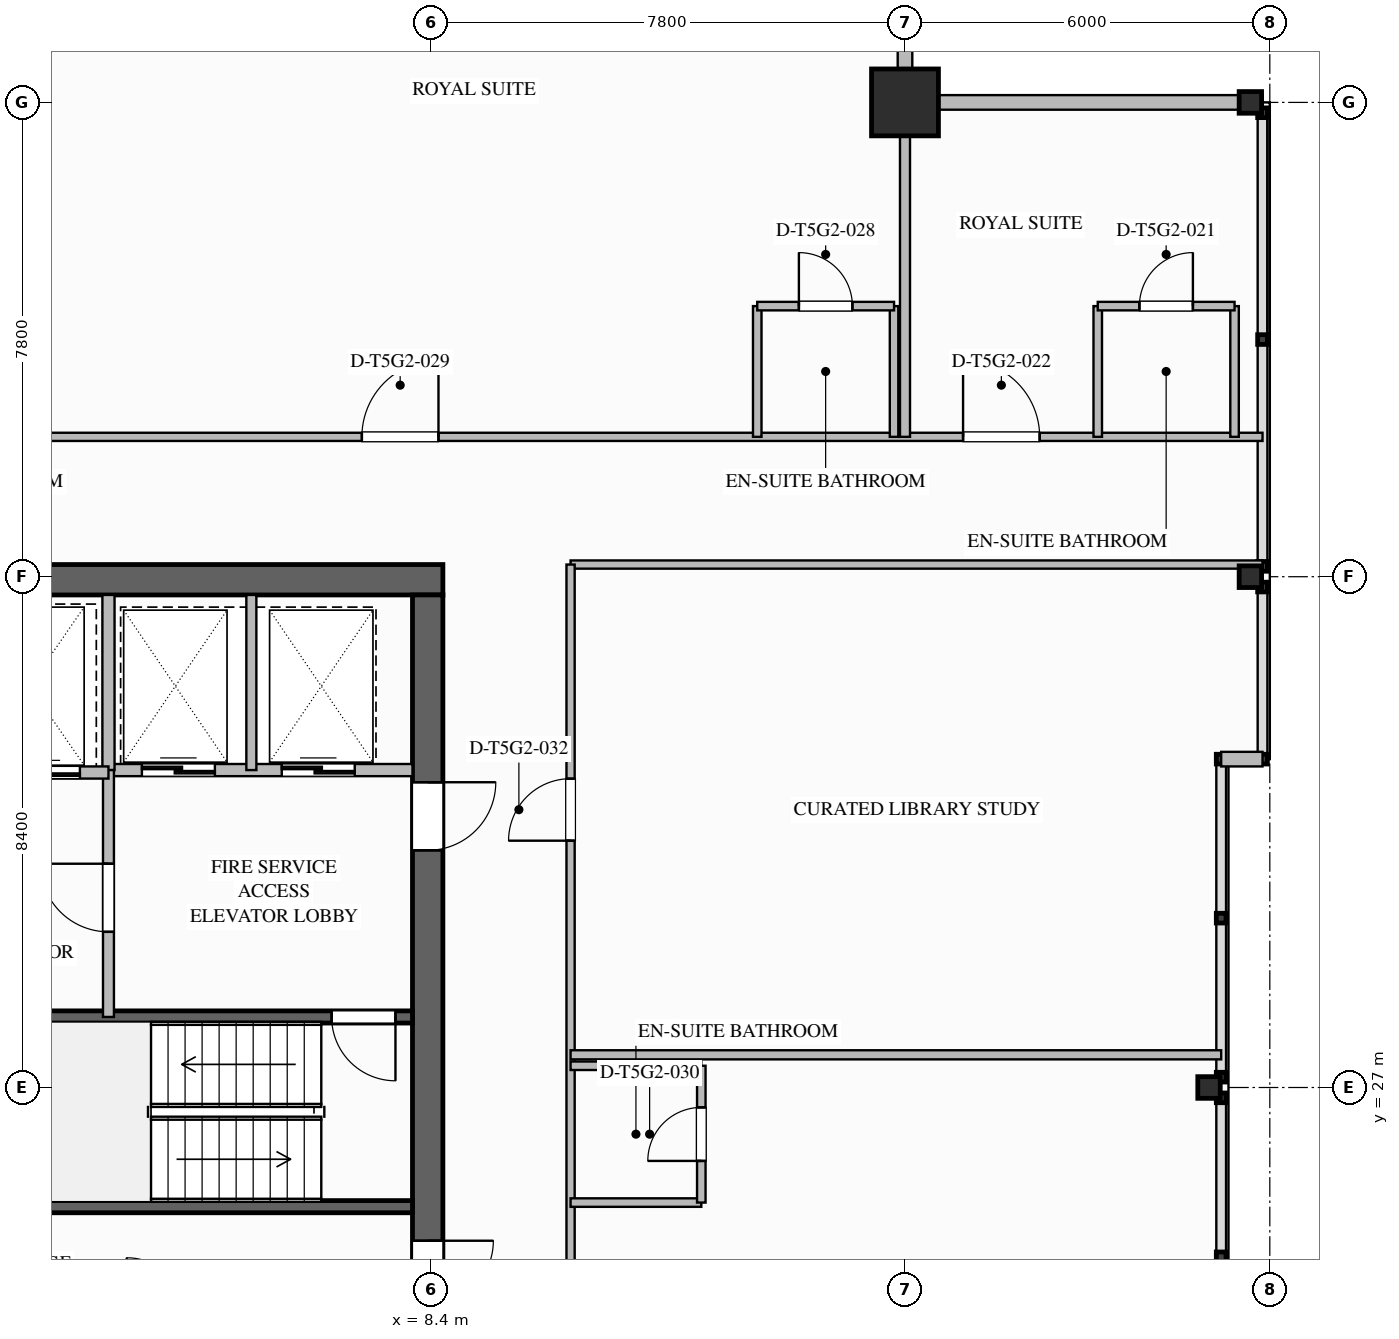
"""IFC4 building model, lengths in metres.
Left out: names, types, materials, properties, quantities, classifications, styles, units other than length and angle.
Written with IfcOpenShell. Run it as: python <this file> out.ifc"""

import sys

from ifc_helpers import new_model, si_unit, direction, frame, frame_2d, origin, origin_2d, place, context, subcontext, project, spatial, rectangle, i_section, extrude, element, fill, save


model = new_model("IFC4")
c1 = context("Model", 3, precision=1e-05, world=origin(), true_north=direction((0.0, 1.0)))
c2 = subcontext(c1, "Body", "Model", "MODEL_VIEW")
j1 = project(units=[si_unit("LENGTHUNIT", "METRE"), si_unit("PLANEANGLEUNIT", "RADIAN")], contexts=[c1])
p1 = place(None, origin())
s1 = spatial("IfcSite", under=j1, at=p1, CompositionType="ELEMENT")
p2 = place(p1, origin())
s2 = spatial("IfcBuilding", under=s1, at=p2, CompositionType="ELEMENT")
p3 = place(p2, frame((0.0, 0.0, 275.95)))
s3 = spatial("IfcBuildingStorey", under=s2, at=p3, CompositionType="ELEMENT", Elevation=275.95)
p4 = place(p3, frame((-8.6, 35.35, 0.0), z_axis=(0.0, 0.0, 1.0), x_axis=(1.0, 0.0, 0.0)))
e1 = element("IfcWall", 1, at=p4, inside=s3, PredefinedType="SHEAR", context=c2, shape_type="SweptSolid", body=[
    extrude(rectangle(XDim=17.2, YDim=0.5, at=frame_2d((8.6, 0.0))), origin(), (0.0, 0.0, 1.0), 3.65),
])
p5 = place(p3, frame((8.35, 35.1, 0.0), z_axis=(0.0, 0.0, 1.0), x_axis=(0.0, -1.0, 0.0)))
e2 = element("IfcWall", 2, at=p5, inside=s3, PredefinedType="SHEAR", context=c2, shape_type="SweptSolid", body=[
    extrude(rectangle(XDim=16.2, YDim=0.5, at=frame_2d((8.1, 0.0))), origin(), (0.0, 0.0, 1.0), 3.65),
])
p6 = place(p5, frame((3.08, 0.0, 0.0)))
e3 = element("IfcOpeningElement", 3, at=p6, cuts=e2, PredefinedType="OPENING", context=c2, shape_type="SweptSolid", body=[
    extrude(rectangle(XDim=1.12, YDim=2.1, at=frame_2d((0.56, 1.05))), frame((0.0, 0.26, 0.0), z_axis=(0.0, -1.0, 0.0), x_axis=(1.0, 0.0, 0.0)), (0.0, 0.0, 1.0), 0.52),
])
p7 = place(p5, frame((10.62, 0.0, 0.0)))
e4 = element("IfcOpeningElement", 4, at=p7, cuts=e2, PredefinedType="OPENING", context=c2, shape_type="SweptSolid", body=[
    extrude(rectangle(XDim=1.08, YDim=2.04, at=frame_2d((0.54, 1.02))), frame((0.0, 0.26, 0.0), z_axis=(0.0, -1.0, 0.0), x_axis=(1.0, 0.0, 0.0)), (0.0, 0.0, 1.0), 0.52),
])
p8 = place(p3, frame((16.2, 43.2, 0.0), z_axis=(0.0, 0.0, 1.0), x_axis=(1.0, 0.0, 0.0)))
e5 = element("IfcColumn", 5, at=p8, inside=s3, PredefinedType="COLUMN", context=c2, shape_type="SweptSolid", body=[
    extrude(rectangle(XDim=1.1, YDim=1.1, at=origin_2d()), origin(), (0.0, 0.0, 1.0), 3.65),
])
for number, where, z_axis, x_axis in (
    (6, (21.2, 27.0, 0.0), (0.0, 0.0, 1.0), (1.0, 0.0, 0.0)),
    (7, (21.88, 35.4, 0.0), (0.0, 0.0, 1.0), (1.0, 0.0, 0.0)),
    (8, (21.88, 43.2, 0.0), (0.0, 0.0, 1.0), (1.0, 0.0, 0.0)),
):
    element("IfcColumn", number, at=place(p3, frame(where, z_axis=z_axis, x_axis=x_axis)), inside=s3, PredefinedType="COLUMN", context=c2, shape_type="SweptSolid", body=[
        extrude(i_section(OverallWidth=0.369, OverallDepth=0.356, WebThickness=0.011, FlangeThickness=0.018, FilletRadius=0.025, at=origin_2d()), origin(), (0.0, 0.0, 1.0), 3.647),
    ])
for number, where, z_axis, x_axis in (
    (9, (16.2, 49.08, 0.0), (0.0, 0.0, 1.0), (0.0, -1.0, 0.0)),
    (10, (16.2, 43.2, 0.0), (0.0, 0.0, 1.0), (1.0, 0.0, 0.0)),
):
    element("IfcWall", number, at=place(p3, frame(where, z_axis=z_axis, x_axis=x_axis)), inside=s3, PredefinedType="STANDARD", context=c2, shape_type="SweptSolid", body=[
        extrude(rectangle(XDim=5.88, YDim=0.24, at=frame_2d((2.94, 0.0))), origin(), (0.0, 0.0, 1.0), 2.779),
    ])
p9 = place(p3, frame((22.08, 32.4, 0.0), z_axis=(0.0, 0.0, 1.0), x_axis=(-1.0, 0.0, 0.0)))
e11 = element("IfcWall", 11, at=p9, inside=s3, PredefinedType="STANDARD", context=c2, shape_type="SweptSolid", body=[
    extrude(rectangle(XDim=0.68, YDim=0.24, at=frame_2d((0.34, 0.0))), origin(), (0.0, 0.0, 1.0), 3.39),
])
p10 = place(p3, frame((0.0, 25.04, 0.0), z_axis=(0.0, 0.0, 1.0), x_axis=(1.0, 0.0, 0.0)))
e12 = element("IfcWall", 12, at=p10, inside=s3, PredefinedType="SOLIDWALL", context=c2, shape_type="SweptSolid", body=[
    extrude(rectangle(XDim=8.1, YDim=0.2, at=frame_2d((4.05, 0.0))), origin(), (0.0, 0.0, 1.0), 3.39),
])
p11 = place(p3, frame((8.1, 28.16, 0.0), z_axis=(0.0, 0.0, 1.0), x_axis=(-1.0, 0.0, 0.0)))
e13 = element("IfcWall", 13, at=p11, inside=s3, PredefinedType="SOLIDWALL", context=c2, shape_type="SweptSolid", body=[
    extrude(rectangle(XDim=8.1, YDim=0.2, at=frame_2d((4.05, 0.0))), origin(), (0.0, 0.0, 1.0), 3.39),
])
p12 = place(p11, frame((0.28, 0.0, 0.0)))
e14 = element("IfcOpeningElement", 14, at=p12, cuts=e13, PredefinedType="OPENING", context=c2, shape_type="SweptSolid", body=[
    extrude(rectangle(XDim=1.05, YDim=2.1, at=frame_2d((0.525, 1.05))), frame((0.0, 0.11, 0.0), z_axis=(0.0, -1.0, 0.0), x_axis=(1.0, 0.0, 0.0)), (0.0, 0.0, 1.0), 0.22),
])
p13 = place(p3, frame((3.1, 32.22, 0.0), z_axis=(0.0, 0.0, 1.0), x_axis=(1.0, 0.0, 0.0)))
e15 = element("IfcWall", 15, at=p13, inside=s3, PredefinedType="SOLIDWALL", context=c2, shape_type="SweptSolid", body=[
    extrude(rectangle(XDim=5.0, YDim=0.2, at=frame_2d((2.5, 0.0))), origin(), (0.0, 0.0, 1.0), 3.39),
])
p14 = place(p13, frame((0.55, 0.0, 0.0)))
e16 = element("IfcOpeningElement", 16, at=p14, cuts=e15, PredefinedType="OPENING", context=c2, shape_type="SweptSolid", body=[
    extrude(rectangle(XDim=1.2, YDim=2.2, at=frame_2d((0.6, 1.1))), frame((0.0, 0.11, 0.0), z_axis=(0.0, -1.0, 0.0), x_axis=(1.0, 0.0, 0.0)), (0.0, 0.0, 1.0), 0.22),
])
p15 = place(p13, frame((2.85, 0.0, 0.0)))
e17 = element("IfcOpeningElement", 17, at=p15, cuts=e15, PredefinedType="OPENING", context=c2, shape_type="SweptSolid", body=[
    extrude(rectangle(XDim=1.2, YDim=2.2, at=frame_2d((0.6, 1.1))), frame((0.0, 0.11, 0.0), z_axis=(0.0, -1.0, 0.0), x_axis=(1.0, 0.0, 0.0)), (0.0, 0.0, 1.0), 0.22),
])
p16 = place(p3, frame((3.1, 32.22, 0.0), z_axis=(0.0, 0.0, 1.0), x_axis=(0.0, 1.0, 0.0)))
e18 = element("IfcWall", 18, at=p16, inside=s3, PredefinedType="SOLIDWALL", context=c2, shape_type="SweptSolid", body=[
    extrude(rectangle(XDim=2.88, YDim=0.2, at=frame_2d((1.44, 0.0))), origin(), (0.0, 0.0, 1.0), 3.39),
])
p17 = place(p3, frame((5.45, 32.22, 0.0), z_axis=(0.0, 0.0, 1.0), x_axis=(0.0, 1.0, 0.0)))
e19 = element("IfcWall", 19, at=p17, inside=s3, PredefinedType="PARTITIONING", context=c2, shape_type="SweptSolid", body=[
    extrude(rectangle(XDim=2.88, YDim=0.165, at=frame_2d((1.44, 0.0))), origin(), (0.0, 0.0, 1.0), 3.39),
])
p18 = place(p3, frame((3.1, 28.16, 0.0), z_axis=(0.0, 0.0, 1.0), x_axis=(0.0, 1.0, 0.0)))
e20 = element("IfcWall", 20, at=p18, inside=s3, PredefinedType="SOLIDWALL", context=c2, shape_type="SweptSolid", body=[
    extrude(rectangle(XDim=4.06, YDim=0.18, at=frame_2d((2.03, 0.0))), origin(), (0.0, 0.0, 1.0), 3.39),
])
p19 = place(p18, frame((1.4, 0.0, 0.0)))
e21 = element("IfcOpeningElement", 21, at=p19, cuts=e20, PredefinedType="OPENING", context=c2, shape_type="SweptSolid", body=[
    extrude(rectangle(XDim=1.12, YDim=2.1, at=frame_2d((0.56, 1.05))), frame((0.0, 0.1, 0.0), z_axis=(0.0, -1.0, 0.0), x_axis=(1.0, 0.0, 0.0)), (0.0, 0.0, 1.0), 0.2),
])
p20 = place(p3, frame((-1.0, 32.18, 0.0), z_axis=(0.0, 0.0, 1.0), x_axis=(1.0, 0.0, 0.0)))
e22 = element("IfcWall", 22, at=p20, inside=s3, PredefinedType="SOLIDWALL", context=c2, shape_type="SweptSolid", body=[
    extrude(rectangle(XDim=4.1, YDim=0.2, at=frame_2d((2.05, 0.0))), origin(), (0.0, 0.0, 1.0), 3.39),
])
p21 = place(p20, frame((0.37, 0.0, 0.0)))
e23 = element("IfcOpeningElement", 23, at=p21, cuts=e22, PredefinedType="OPENING", context=c2, shape_type="SweptSolid", body=[
    extrude(rectangle(XDim=1.3, YDim=2.2, at=frame_2d((0.65, 1.1))), frame((0.0, 0.11, 0.0), z_axis=(0.0, -1.0, 0.0), x_axis=(1.0, 0.0, 0.0)), (0.0, 0.0, 1.0), 0.22),
])
p22 = place(p20, frame((2.33, 0.0, 0.0)))
e24 = element("IfcOpeningElement", 24, at=p22, cuts=e22, PredefinedType="OPENING", context=c2, shape_type="SweptSolid", body=[
    extrude(rectangle(XDim=1.3, YDim=2.2, at=frame_2d((0.65, 1.1))), frame((0.0, 0.11, 0.0), z_axis=(0.0, -1.0, 0.0), x_axis=(1.0, 0.0, 0.0)), (0.0, 0.0, 1.0), 0.22),
])
p23 = place(p3, frame((-16.2, 37.7, 0.0), z_axis=(0.0, 0.0, 1.0), x_axis=(1.0, 0.0, 0.0)))
e25 = element("IfcWall", 25, at=p23, inside=s3, PredefinedType="PARTITIONING", context=c2, shape_type="SweptSolid", body=[
    extrude(rectangle(XDim=38.28, YDim=0.135, at=frame_2d((19.14, 0.0))), origin(), (0.0, 0.0, 1.0), 3.39),
])
p24 = place(p23, frame((33.355, 0.0, 0.0)))
e26 = element("IfcOpeningElement", 26, at=p24, cuts=e25, PredefinedType="OPENING", context=c2, shape_type="SweptSolid", body=[
    extrude(rectangle(XDim=1.26, YDim=2.2, at=frame_2d((0.63, 1.1))), frame((0.0, 0.077, 0.0), z_axis=(0.0, -1.0, 0.0), x_axis=(1.0, 0.0, 0.0)), (0.0, 0.0, 1.0), 0.155),
])
p25 = place(p23, frame((7.268, 0.0, 0.0)))
e27 = element("IfcOpeningElement", 27, at=p25, cuts=e25, PredefinedType="OPENING", context=c2, shape_type="SweptSolid", body=[
    extrude(rectangle(XDim=1.26, YDim=2.2, at=frame_2d((0.63, 1.1))), frame((0.0, 0.077, 0.0), z_axis=(0.0, -1.0, 0.0), x_axis=(1.0, 0.0, 0.0)), (0.0, 0.0, 1.0), 0.155),
])
p26 = place(p23, frame((23.468, 0.0, 0.0)))
e28 = element("IfcOpeningElement", 28, at=p26, cuts=e25, PredefinedType="OPENING", context=c2, shape_type="SweptSolid", body=[
    extrude(rectangle(XDim=1.26, YDim=2.2, at=frame_2d((0.63, 1.1))), frame((0.0, 0.077, 0.0), z_axis=(0.0, -1.0, 0.0), x_axis=(1.0, 0.0, 0.0)), (0.0, 0.0, 1.0), 0.155),
])
p27 = place(p3, frame((10.7, 35.6, 0.0), z_axis=(0.0, 0.0, 1.0), x_axis=(1.0, 0.0, 0.0)))
e29 = element("IfcWall", 29, at=p27, inside=s3, PredefinedType="PARTITIONING", context=c2, shape_type="SweptSolid", body=[
    extrude(rectangle(XDim=11.38, YDim=0.135, at=frame_2d((5.69, 0.0))), origin(), (0.0, 0.0, 1.0), 2.767),
])
p28 = place(p3, frame((10.7, 18.4, 0.0), z_axis=(0.0, 0.0, 1.0), x_axis=(0.0, 1.0, 0.0)))
e30 = element("IfcWall", 30, at=p28, inside=s3, PredefinedType="PARTITIONING", context=c2, shape_type="SweptSolid", body=[
    extrude(rectangle(XDim=17.2, YDim=0.135, at=frame_2d((8.6, 0.0))), origin(), (0.0, 0.0, 1.0), 3.39),
])
p29 = place(p28, frame((2.724, 0.0, 0.0)))
e31 = element("IfcOpeningElement", 31, at=p29, cuts=e30, PredefinedType="OPENING", context=c2, shape_type="SweptSolid", body=[
    extrude(rectangle(XDim=1.26, YDim=2.2, at=frame_2d((0.63, 1.1))), frame((0.0, 0.077, 0.0), z_axis=(0.0, -1.0, 0.0), x_axis=(1.0, 0.0, 0.0)), (0.0, 0.0, 1.0), 0.155),
])
p30 = place(p28, frame((12.659, 0.0, 0.0)))
e32 = element("IfcOpeningElement", 32, at=p30, cuts=e30, PredefinedType="OPENING", context=c2, shape_type="SweptSolid", body=[
    extrude(rectangle(XDim=1.02, YDim=2.15, at=frame_2d((0.51, 1.075))), frame((0.0, 0.077, 0.0), z_axis=(0.0, -1.0, 0.0), x_axis=(1.0, 0.0, 0.0)), (0.0, 0.0, 1.0), 0.155),
])
p31 = place(p3, frame((16.2, 37.7, 0.0), z_axis=(0.0, 0.0, 1.0), x_axis=(0.0, 1.0, 0.0)))
e33 = element("IfcWall", 33, at=p31, inside=s3, PredefinedType="PARTITIONING", context=c2, shape_type="SweptSolid", body=[
    extrude(rectangle(XDim=5.38, YDim=0.165, at=frame_2d((2.69, 0.0))), origin(), (0.0, 0.0, 1.0), 2.764),
])
for number, where, z_axis, x_axis in (
    (34, (19.37, 37.7, 0.0), (0.0, 0.0, 1.0), (0.0, 1.0, 0.0)),
    (35, (21.62, 37.7, 0.0), (0.0, 0.0, 1.0), (0.0, 1.0, 0.0)),
):
    element("IfcWall", number, at=place(p3, frame(where, z_axis=z_axis, x_axis=x_axis)), inside=s3, PredefinedType="PLUMBINGWALL", context=c2, shape_type="SweptSolid", body=[
        extrude(rectangle(XDim=2.15, YDim=0.14, at=frame_2d((1.075, 0.0))), origin(), (0.0, 0.0, 1.0), 3.39),
    ])
p32 = place(p3, frame((19.37, 39.85, 0.0), z_axis=(0.0, 0.0, 1.0), x_axis=(1.0, 0.0, 0.0)))
e36 = element("IfcWall", 36, at=p32, inside=s3, PredefinedType="PLUMBINGWALL", context=c2, shape_type="SweptSolid", body=[
    extrude(rectangle(XDim=2.25, YDim=0.14, at=frame_2d((1.125, 0.0))), origin(), (0.0, 0.0, 1.0), 3.39),
])
p33 = place(p32, frame((0.685, 0.0, 0.0)))
e37 = element("IfcOpeningElement", 37, at=p33, cuts=e36, PredefinedType="OPENING", context=c2, shape_type="SweptSolid", body=[
    extrude(rectangle(XDim=0.88, YDim=2.1, at=frame_2d((0.44, 1.05))), frame((0.0, 0.08, 0.0), z_axis=(0.0, -1.0, 0.0), x_axis=(1.0, 0.0, 0.0)), (0.0, 0.0, 1.0), 0.16),
])
p34 = place(p3, frame((13.77, 37.7, 0.0), z_axis=(0.0, 0.0, 1.0), x_axis=(0.0, 1.0, 0.0)))
e38 = element("IfcWall", 38, at=p34, inside=s3, PredefinedType="PLUMBINGWALL", context=c2, shape_type="SweptSolid", body=[
    extrude(rectangle(XDim=2.15, YDim=0.14, at=frame_2d((1.075, 0.0))), origin(), (0.0, 0.0, 1.0), 3.39),
])
p35 = place(p3, frame((16.02, 37.7, 0.0), z_axis=(0.0, 0.0, 1.0), x_axis=(0.0, 1.0, 0.0)))
e39 = element("IfcWall", 39, at=p35, inside=s3, PredefinedType="PLUMBINGWALL", context=c2, shape_type="SweptSolid", body=[
    extrude(rectangle(XDim=2.15, YDim=0.14, at=frame_2d((1.075, 0.0))), origin(), (0.0, 0.0, 1.0), 2.764),
])
p36 = place(p3, frame((13.77, 39.85, 0.0), z_axis=(0.0, 0.0, 1.0), x_axis=(1.0, 0.0, 0.0)))
e40 = element("IfcWall", 40, at=p36, inside=s3, PredefinedType="PLUMBINGWALL", context=c2, shape_type="SweptSolid", body=[
    extrude(rectangle(XDim=2.25, YDim=0.14, at=frame_2d((1.125, 0.0))), origin(), (0.0, 0.0, 1.0), 3.39),
])
p37 = place(p36, frame((0.685, 0.0, 0.0)))
e41 = element("IfcOpeningElement", 41, at=p37, cuts=e40, PredefinedType="OPENING", context=c2, shape_type="SweptSolid", body=[
    extrude(rectangle(XDim=0.88, YDim=2.1, at=frame_2d((0.44, 1.05))), frame((0.0, 0.08, 0.0), z_axis=(0.0, -1.0, 0.0), x_axis=(1.0, 0.0, 0.0)), (0.0, 0.0, 1.0), 0.16),
])
for number, where, z_axis, x_axis in (
    (42, (10.7, 25.107, 0.0), (0.0, 0.0, 1.0), (1.0, 0.0, 0.0)),
    (43, (10.7, 27.357, 0.0), (0.0, 0.0, 1.0), (1.0, 0.0, 0.0)),
):
    element("IfcWall", number, at=place(p3, frame(where, z_axis=z_axis, x_axis=x_axis)), inside=s3, PredefinedType="PLUMBINGWALL", context=c2, shape_type="SweptSolid", body=[
        extrude(rectangle(XDim=2.15, YDim=0.14, at=frame_2d((1.075, 0.0))), origin(), (0.0, 0.0, 1.0), 3.39),
    ])
p38 = place(p3, frame((12.85, 25.107, 0.0), z_axis=(0.0, 0.0, 1.0), x_axis=(0.0, 1.0, 0.0)))
e44 = element("IfcWall", 44, at=p38, inside=s3, PredefinedType="PLUMBINGWALL", context=c2, shape_type="SweptSolid", body=[
    extrude(rectangle(XDim=2.25, YDim=0.14, at=frame_2d((1.125, 0.0))), origin(), (0.0, 0.0, 1.0), 3.39),
])
p39 = place(p38, frame((0.685, 0.0, 0.0)))
e45 = element("IfcOpeningElement", 45, at=p39, cuts=e44, PredefinedType="OPENING", context=c2, shape_type="SweptSolid", body=[
    extrude(rectangle(XDim=0.88, YDim=2.1, at=frame_2d((0.44, 1.05))), frame((0.0, 0.08, 0.0), z_axis=(0.0, -1.0, 0.0), x_axis=(1.0, 0.0, 0.0)), (0.0, 0.0, 1.0), 0.16),
])
p40 = place(p3, frame((10.7, 27.538, 0.0), z_axis=(0.0, 0.0, 1.0), x_axis=(1.0, 0.0, 0.0)))
e46 = element("IfcWall", 46, at=p40, inside=s3, PredefinedType="PARTITIONING", context=c2, shape_type="SweptSolid", body=[
    extrude(rectangle(XDim=10.7, YDim=0.15, at=frame_2d((5.35, 0.0))), origin(), (0.0, 0.0, 1.0), 3.39),
])
p41 = place(p12, origin())
e47 = element("IfcDoor", 47, at=p41, inside=s3, OperationType="SINGLE_SWING_LEFT", PredefinedType="DOOR", context=c2, shape_type="SweptSolid", body=[
    extrude(rectangle(XDim=1.05, YDim=2.1, at=frame_2d((0.525, 1.05))), frame((0.0, 0.025, 0.0), z_axis=(0.0, -1.0, 0.0), x_axis=(1.0, 0.0, 0.0)), (0.0, 0.0, 1.0), 0.05),
])
fill(e14, e47)
p42 = place(p14, origin())
e48 = element("IfcDoor", 48, at=p42, inside=s3, OperationType="SLIDING_TO_LEFT", PredefinedType="DOOR", context=c2, shape_type="SweptSolid", body=[
    extrude(rectangle(XDim=1.2, YDim=2.2, at=frame_2d((0.6, 1.1))), frame((0.0, 0.025, 0.0), z_axis=(0.0, -1.0, 0.0), x_axis=(1.0, 0.0, 0.0)), (0.0, 0.0, 1.0), 0.05),
])
fill(e16, e48)
p43 = place(p15, origin())
e49 = element("IfcDoor", 49, at=p43, inside=s3, OperationType="SLIDING_TO_LEFT", PredefinedType="DOOR", context=c2, shape_type="SweptSolid", body=[
    extrude(rectangle(XDim=1.2, YDim=2.2, at=frame_2d((0.6, 1.1))), frame((0.0, 0.025, 0.0), z_axis=(0.0, -1.0, 0.0), x_axis=(1.0, 0.0, 0.0)), (0.0, 0.0, 1.0), 0.05),
])
fill(e17, e49)
p44 = place(p19, origin())
e50 = element("IfcDoor", 50, at=p44, inside=s3, OperationType="SINGLE_SWING_RIGHT", PredefinedType="DOOR", context=c2, shape_type="SweptSolid", body=[
    extrude(rectangle(XDim=1.12, YDim=2.1, at=frame_2d((0.56, 1.05))), frame((0.0, 0.025, 0.0), z_axis=(0.0, -1.0, 0.0), x_axis=(1.0, 0.0, 0.0)), (0.0, 0.0, 1.0), 0.05),
])
fill(e21, e50)
p45 = place(p6, origin())
e51 = element("IfcDoor", 51, at=p45, inside=s3, OperationType="SINGLE_SWING_LEFT", PredefinedType="DOOR", context=c2, shape_type="SweptSolid", body=[
    extrude(rectangle(XDim=1.12, YDim=2.1, at=frame_2d((0.56, 1.05))), frame((0.0, 0.025, 0.0), z_axis=(0.0, -1.0, 0.0), x_axis=(1.0, 0.0, 0.0)), (0.0, 0.0, 1.0), 0.05),
])
fill(e3, e51)
p46 = place(p22, origin())
e52 = element("IfcDoor", 52, at=p46, inside=s3, OperationType="SLIDING_TO_LEFT", PredefinedType="DOOR", context=c2, shape_type="SweptSolid", body=[
    extrude(rectangle(XDim=1.3, YDim=2.2, at=frame_2d((0.65, 1.1))), frame((0.0, 0.025, 0.0), z_axis=(0.0, -1.0, 0.0), x_axis=(1.0, 0.0, 0.0)), (0.0, 0.0, 1.0), 0.05),
])
fill(e24, e52)
p47 = place(p7, origin())
e53 = element("IfcDoor", 53, at=p47, inside=s3, OperationType="SINGLE_SWING_LEFT", PredefinedType="DOOR", context=c2, shape_type="SweptSolid", body=[
    extrude(rectangle(XDim=1.08, YDim=2.04, at=frame_2d((0.54, 1.02))), frame((0.0, 0.025, 0.0), z_axis=(0.0, -1.0, 0.0), x_axis=(1.0, 0.0, 0.0)), (0.0, 0.0, 1.0), 0.05),
])
fill(e4, e53)
p48 = place(p33, origin())
e54 = element("IfcDoor", 54, at=p48, inside=s3, OperationType="SINGLE_SWING_RIGHT", PredefinedType="DOOR", context=c2, shape_type="SweptSolid", body=[
    extrude(rectangle(XDim=0.88, YDim=2.1, at=frame_2d((0.44, 1.05))), frame((0.0, 0.025, 0.0), z_axis=(0.0, -1.0, 0.0), x_axis=(1.0, 0.0, 0.0)), (0.0, 0.0, 1.0), 0.05),
])
fill(e37, e54)
p49 = place(p24, origin())
e55 = element("IfcDoor", 55, at=p49, inside=s3, OperationType="SINGLE_SWING_LEFT", PredefinedType="DOOR", context=c2, shape_type="SweptSolid", body=[
    extrude(rectangle(XDim=1.26, YDim=2.2, at=frame_2d((0.63, 1.1))), frame((0.0, 0.025, 0.0), z_axis=(0.0, -1.0, 0.0), x_axis=(1.0, 0.0, 0.0)), (0.0, 0.0, 1.0), 0.05),
])
fill(e26, e55)
p50 = place(p37, origin())
e56 = element("IfcDoor", 56, at=p50, inside=s3, OperationType="SINGLE_SWING_LEFT", PredefinedType="DOOR", context=c2, shape_type="SweptSolid", body=[
    extrude(rectangle(XDim=0.88, YDim=2.1, at=frame_2d((0.44, 1.05))), frame((0.0, 0.025, 0.0), z_axis=(0.0, -1.0, 0.0), x_axis=(1.0, 0.0, 0.0)), (0.0, 0.0, 1.0), 0.05),
])
fill(e41, e56)
p51 = place(p26, origin())
e57 = element("IfcDoor", 57, at=p51, inside=s3, OperationType="SINGLE_SWING_RIGHT", PredefinedType="DOOR", context=c2, shape_type="SweptSolid", body=[
    extrude(rectangle(XDim=1.26, YDim=2.2, at=frame_2d((0.63, 1.1))), frame((0.0, 0.025, 0.0), z_axis=(0.0, -1.0, 0.0), x_axis=(1.0, 0.0, 0.0)), (0.0, 0.0, 1.0), 0.05),
])
fill(e28, e57)
p52 = place(p39, origin())
e58 = element("IfcDoor", 58, at=p52, inside=s3, OperationType="SINGLE_SWING_LEFT", PredefinedType="DOOR", context=c2, shape_type="SweptSolid", body=[
    extrude(rectangle(XDim=0.88, YDim=2.1, at=frame_2d((0.44, 1.05))), frame((0.0, 0.025, 0.0), z_axis=(0.0, -1.0, 0.0), x_axis=(1.0, 0.0, 0.0)), (0.0, 0.0, 1.0), 0.05),
])
fill(e45, e58)
p53 = place(p30, origin())
e59 = element("IfcDoor", 59, at=p53, inside=s3, OperationType="SINGLE_SWING_LEFT", PredefinedType="DOOR", context=c2, shape_type="SweptSolid", body=[
    extrude(rectangle(XDim=1.02, YDim=2.15, at=frame_2d((0.51, 1.075))), frame((0.0, 0.025, 0.0), z_axis=(0.0, -1.0, 0.0), x_axis=(1.0, 0.0, 0.0)), (0.0, 0.0, 1.0), 0.05),
])
fill(e32, e59)
save(model, sys.argv[1])
